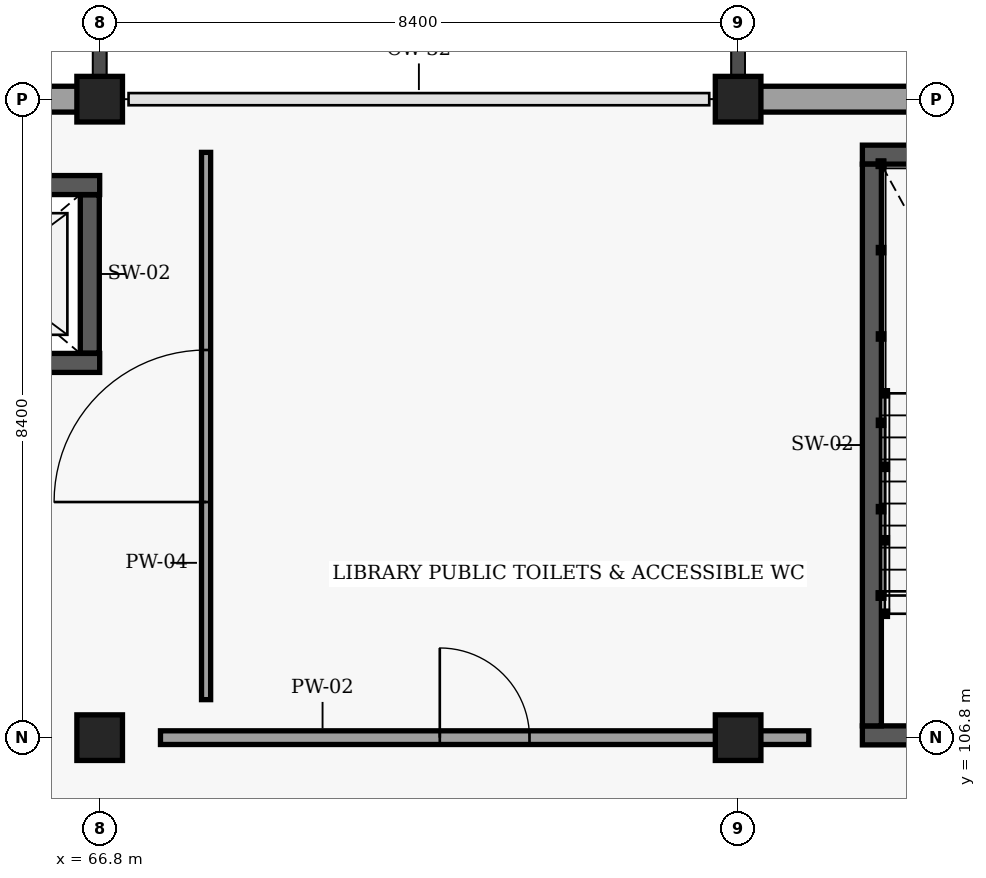
"""IFC4 building model, lengths in metres.
Left out: names, types, materials, properties, quantities, classifications, styles, units other than length and angle.
Written with IfcOpenShell. Run it as: python <this file> out.ifc"""

import sys

from ifc_helpers import new_model, si_unit, direction, frame, frame_2d, origin, origin_2d, place, context, subcontext, project, spatial, rectangle, extrude, element, fill, save


model = new_model("IFC4")
c1 = context("Model", 3, precision=1e-05, world=origin(), true_north=direction((0.0, 1.0)))
c2 = subcontext(c1, "Body", "Model", "MODEL_VIEW")
j1 = project(units=[si_unit("LENGTHUNIT", "METRE"), si_unit("PLANEANGLEUNIT", "RADIAN")], contexts=[c1])
p1 = place(None, origin())
s1 = spatial("IfcSite", under=j1, at=p1, CompositionType="ELEMENT")
p2 = place(p1, origin())
s2 = spatial("IfcBuilding", under=s1, at=p2, CompositionType="ELEMENT")
p3 = place(p2, frame((0.0, 0.0, 12.9)))
s3 = spatial("IfcBuildingStorey", under=s2, at=p3, CompositionType="ELEMENT", Elevation=12.9)
for number, where, z_axis, x_axis in (
    (1, (66.8, 106.8, 0.0), (0.0, 0.0, 1.0), (1.0, 0.0, 0.0)),
    (2, (66.8, 115.2, 0.0), (0.0, 0.0, 1.0), (1.0, 0.0, 0.0)),
    (3, (75.2, 106.8, 0.0), (0.0, 0.0, 1.0), (1.0, 0.0, 0.0)),
    (4, (75.2, 115.2, 0.0), (0.0, 0.0, 1.0), (1.0, 0.0, 0.0)),
):
    element("IfcColumn", number, at=place(p3, frame(where, z_axis=z_axis, x_axis=x_axis)), inside=s3, PredefinedType="COLUMN", context=c2, shape_type="SweptSolid", body=[
        extrude(rectangle(XDim=0.6, YDim=0.6, at=origin_2d()), origin(), (0.0, 0.0, 1.0), 3.6),
    ])
p4 = place(p3, frame((58.5, 115.2, 0.0), z_axis=(0.0, 0.0, 1.0), x_axis=(1.0, 0.0, 0.0)))
e5 = element("IfcWall", 5, at=p4, inside=s3, PredefinedType="SOLIDWALL", context=c2, shape_type="SweptSolid", body=[
    extrude(rectangle(XDim=8.2, YDim=0.34, at=frame_2d((4.1, 0.0))), origin(), (0.0, 0.0, 1.0), 2.885),
])
p5 = place(p3, frame((75.3, 115.2, 0.0), z_axis=(0.0, 0.0, 1.0), x_axis=(1.0, 0.0, 0.0)))
e6 = element("IfcWall", 6, at=p5, inside=s3, PredefinedType="SOLIDWALL", context=c2, shape_type="SweptSolid", body=[
    extrude(rectangle(XDim=8.6, YDim=0.34, at=frame_2d((4.3, 0.0))), origin(), (0.0, 0.0, 1.0), 2.885),
])
p6 = place(p3, frame((63.8, 111.73, 0.0), z_axis=(0.0, 0.0, 1.0), x_axis=(1.0, 0.0, 0.0)))
e7 = element("IfcWall", 7, at=p6, inside=s3, PredefinedType="SHEAR", context=c2, shape_type="SweptSolid", body=[
    extrude(rectangle(XDim=3.0, YDim=0.25, at=frame_2d((1.5, 0.0))), origin(), (0.0, 0.0, 1.0), 3.38),
])
p7 = place(p6, frame((0.89, 0.0, 0.0)))
e8 = element("IfcOpeningElement", 8, at=p7, cuts=e7, PredefinedType="OPENING", context=c2, shape_type="SweptSolid", body=[
    extrude(rectangle(XDim=1.22, YDim=2.18, at=frame_2d((0.61, 1.09))), frame((0.0, 0.135, 0.0), z_axis=(0.0, -1.0, 0.0), x_axis=(1.0, 0.0, 0.0)), (0.0, 0.0, 1.0), 0.27),
])
p8 = place(p3, frame((66.8, 114.07, 0.0), z_axis=(0.0, 0.0, 1.0), x_axis=(-1.0, 0.0, 0.0)))
e9 = element("IfcWall", 9, at=p8, inside=s3, PredefinedType="SHEAR", context=c2, shape_type="SweptSolid", body=[
    extrude(rectangle(XDim=3.0, YDim=0.25, at=frame_2d((1.5, 0.0))), origin(), (0.0, 0.0, 1.0), 3.38),
])
p9 = place(p3, frame((66.67, 111.86, 0.0), z_axis=(0.0, 0.0, 1.0), x_axis=(0.0, 1.0, 0.0)))
e10 = element("IfcWall", 10, at=p9, inside=s3, PredefinedType="SHEAR", context=c2, shape_type="SweptSolid", body=[
    extrude(rectangle(XDim=2.08, YDim=0.25, at=frame_2d((1.04, 0.0))), origin(), (0.0, 0.0, 1.0), 3.38),
])
p10 = place(p3, frame((80.445, 106.83, 0.0), z_axis=(0.0, 0.0, 1.0), x_axis=(-1.0, 0.0, 0.0)))
e11 = element("IfcWall", 11, at=p10, inside=s3, PredefinedType="SHEAR", context=c2, shape_type="SweptSolid", body=[
    extrude(rectangle(XDim=3.61, YDim=0.25, at=frame_2d((1.805, 0.0))), origin(), (0.0, 0.0, 1.0), 3.38),
])
p11 = place(p10, frame((1.235, 0.0, 0.0)))
e12 = element("IfcOpeningElement", 12, at=p11, cuts=e11, PredefinedType="OPENING", context=c2, shape_type="SweptSolid", body=[
    extrude(rectangle(XDim=1.14, YDim=2.15, at=frame_2d((0.57, 1.075))), frame((0.0, 0.135, 0.0), z_axis=(0.0, -1.0, 0.0), x_axis=(1.0, 0.0, 0.0)), (0.0, 0.0, 1.0), 0.27),
])
p12 = place(p3, frame((76.835, 114.47, 0.0), z_axis=(0.0, 0.0, 1.0), x_axis=(1.0, 0.0, 0.0)))
e13 = element("IfcWall", 13, at=p12, inside=s3, PredefinedType="SHEAR", context=c2, shape_type="SweptSolid", body=[
    extrude(rectangle(XDim=3.61, YDim=0.25, at=frame_2d((1.805, 0.0))), origin(), (0.0, 0.0, 1.0), 3.38),
])
p13 = place(p3, frame((76.96, 106.955, 0.0), z_axis=(0.0, 0.0, 1.0), x_axis=(0.0, 1.0, 0.0)))
e14 = element("IfcWall", 14, at=p13, inside=s3, PredefinedType="SHEAR", context=c2, shape_type="SweptSolid", body=[
    extrude(rectangle(XDim=7.39, YDim=0.25, at=frame_2d((3.695, 0.0))), origin(), (0.0, 0.0, 1.0), 3.38),
])
p14 = place(p3, frame((67.6, 106.8, 0.0), z_axis=(0.0, 0.0, 1.0), x_axis=(1.0, 0.0, 0.0)))
e15 = element("IfcWall", 15, at=p14, inside=s3, PredefinedType="PARTITIONING", context=c2, shape_type="SweptSolid", body=[
    extrude(rectangle(XDim=8.53, YDim=0.18, at=frame_2d((4.265, 0.0))), origin(), (0.0, 0.0, 1.0), 2.615),
])
p15 = place(p14, frame((3.675, 0.0, 0.0)))
e16 = element("IfcOpeningElement", 16, at=p15, cuts=e15, PredefinedType="OPENING", context=c2, shape_type="SweptSolid", body=[
    extrude(rectangle(XDim=1.18, YDim=2.18, at=frame_2d((0.59, 1.09))), frame((0.0, 0.1, 0.0), z_axis=(0.0, -1.0, 0.0), x_axis=(1.0, 0.0, 0.0)), (0.0, 0.0, 1.0), 0.2),
])
p16 = place(p3, frame((68.2, 107.3, 0.0), z_axis=(0.0, 0.0, 1.0), x_axis=(0.0, 1.0, 0.0)))
e17 = element("IfcWall", 17, at=p16, inside=s3, PredefinedType="PARTITIONING", context=c2, shape_type="SweptSolid", body=[
    extrude(rectangle(XDim=7.2, YDim=0.12, at=frame_2d((3.6, 0.0))), origin(), (0.0, 0.0, 1.0), 3.365),
])
p17 = place(p16, frame((2.6, 0.0, 0.0)))
e18 = element("IfcOpeningElement", 18, at=p17, cuts=e17, PredefinedType="OPENING", context=c2, shape_type="SweptSolid", body=[
    extrude(rectangle(XDim=2.0, YDim=2.3, at=frame_2d((1.0, 1.15))), frame((0.0, 0.07, 0.0), z_axis=(0.0, -1.0, 0.0), x_axis=(1.0, 0.0, 0.0)), (0.0, 0.0, 1.0), 0.14),
])
p18 = place(p15, origin())
e19 = element("IfcDoor", 19, at=p18, inside=s3, OperationType="SINGLE_SWING_LEFT", PredefinedType="DOOR", context=c2, shape_type="SweptSolid", body=[
    extrude(rectangle(XDim=1.18, YDim=2.18, at=frame_2d((0.59, 1.09))), frame((0.0, 0.025, 0.0), z_axis=(0.0, -1.0, 0.0), x_axis=(1.0, 0.0, 0.0)), (0.0, 0.0, 1.0), 0.05),
])
fill(e16, e19)
p19 = place(p17, origin())
e20 = element("IfcDoor", 20, at=p19, inside=s3, OperationType="DOUBLE_DOOR_SINGLE_SWING", PredefinedType="DOOR", context=c2, shape_type="SweptSolid", body=[
    extrude(rectangle(XDim=2.0, YDim=2.3, at=frame_2d((1.0, 1.15))), frame((0.0, 0.025, 0.0), z_axis=(0.0, -1.0, 0.0), x_axis=(1.0, 0.0, 0.0)), (0.0, 0.0, 1.0), 0.05),
])
fill(e18, e20)
save(model, sys.argv[1])
